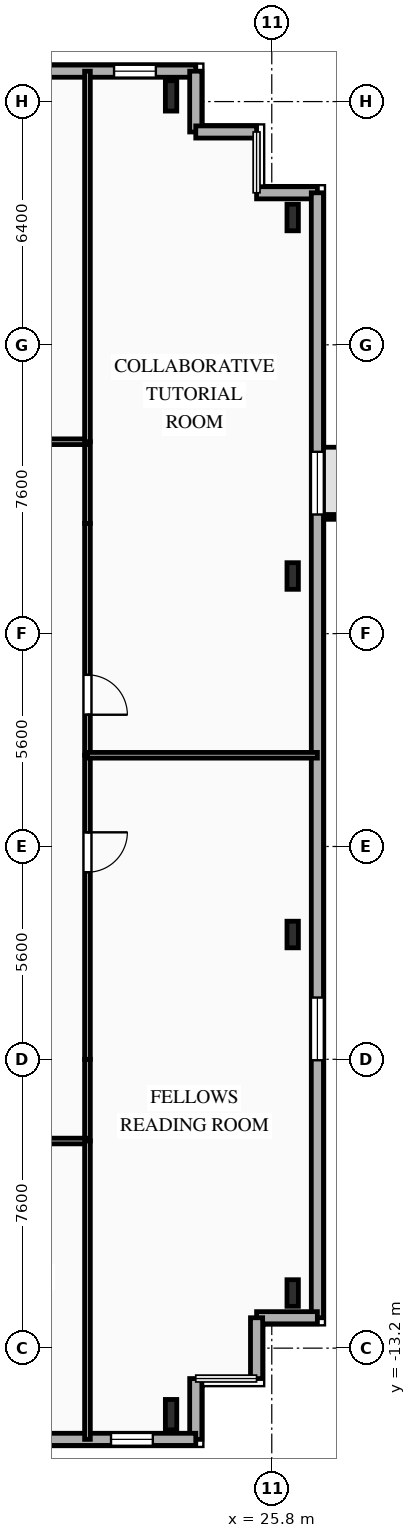
"""IFC4 building model, lengths in metres.
Left out: names, types, materials, properties, quantities, classifications, styles, units other than length and angle.
Written with IfcOpenShell. Run it as: python <this file> out.ifc"""

import sys

from ifc_helpers import new_model, si_unit, direction, frame, frame_2d, origin, origin_2d, place, context, subcontext, project, spatial, rectangle, i_section, extrude, element, fill, save


model = new_model("IFC4")
c1 = context("Model", 3, precision=1e-05, world=origin(), true_north=direction((0.0, 1.0)))
c2 = subcontext(c1, "Body", "Model", "MODEL_VIEW")
j1 = project(units=[si_unit("LENGTHUNIT", "METRE"), si_unit("PLANEANGLEUNIT", "RADIAN")], contexts=[c1])
p1 = place(None, origin())
s1 = spatial("IfcSite", under=j1, at=p1, CompositionType="ELEMENT")
p2 = place(p1, origin())
s2 = spatial("IfcBuilding", under=s1, at=p2, CompositionType="ELEMENT")
p3 = place(p2, frame((0.0, 0.0, 164.5)))
s3 = spatial("IfcBuildingStorey", under=s2, at=p3, CompositionType="ELEMENT", Elevation=164.5)
for number, where, z_axis, x_axis in (
    (1, (23.15, -14.95, 0.0), (0.0, 0.0, 1.0), (1.0, 0.0, 0.0)),
    (2, (23.15, 19.75, 0.0), (0.0, 0.0, 1.0), (1.0, 0.0, 0.0)),
):
    element("IfcColumn", number, at=place(p3, frame(where, z_axis=z_axis, x_axis=x_axis)), inside=s3, PredefinedType="COLUMN", context=c2, shape_type="SweptSolid", body=[
        extrude(i_section(OverallWidth=0.3, OverallDepth=0.8, WebThickness=0.018, FlangeThickness=0.033, FilletRadius=0.03, at=origin_2d()), origin(), (0.0, 0.0, 1.0), 3.35),
    ])
for number, where, z_axis, x_axis in (
    (3, (26.35, -11.75, 0.0), (0.0, 0.0, 1.0), (1.0, 0.0, 0.0)),
    (4, (26.35, -2.317, 0.0), (0.0, 0.0, 1.0), (1.0, 0.0, 0.0)),
    (5, (26.35, 7.117, 0.0), (0.0, 0.0, 1.0), (1.0, 0.0, 0.0)),
    (6, (26.35, 16.55, 0.0), (0.0, 0.0, 1.0), (1.0, 0.0, 0.0)),
):
    element("IfcColumn", number, at=place(p3, frame(where, z_axis=z_axis, x_axis=x_axis)), inside=s3, PredefinedType="COLUMN", context=c2, shape_type="SweptSolid", body=[
        extrude(i_section(OverallWidth=0.3, OverallDepth=0.7, WebThickness=0.017, FlangeThickness=0.032, FilletRadius=0.027, at=origin_2d()), origin(), (0.0, 0.0, 1.0), 3.35),
    ])
p4 = place(p3, frame((-25.8, 20.4, 0.0), z_axis=(0.0, 0.0, 1.0), x_axis=(1.0, 0.0, 0.0)))
e7 = element("IfcWall", 7, at=p4, inside=s3, PredefinedType="SOLIDWALL", context=c2, shape_type="SweptSolid", body=[
    extrude(rectangle(XDim=49.6, YDim=0.32, at=frame_2d((24.8, 0.0))), origin(), (0.0, 0.0, 1.0), 3.04),
])
p5 = place(p4, frame((2.135, 0.0, 0.85)))
e8 = element("IfcOpeningElement", 8, at=p5, cuts=e7, PredefinedType="OPENING", context=c2, shape_type="SweptSolid", body=[
    extrude(rectangle(XDim=1.65, YDim=1.85, at=frame_2d((0.825, 0.925))), frame((0.0, 0.17, 0.0), z_axis=(0.0, -1.0, 0.0), x_axis=(1.0, 0.0, 0.0)), (0.0, 0.0, 1.0), 0.34),
])
p6 = place(p4, frame((6.295, 0.0, 0.85)))
e9 = element("IfcOpeningElement", 9, at=p6, cuts=e7, PredefinedType="OPENING", context=c2, shape_type="SweptSolid", body=[
    extrude(rectangle(XDim=1.65, YDim=1.85, at=frame_2d((0.825, 0.925))), frame((0.0, 0.17, 0.0), z_axis=(0.0, -1.0, 0.0), x_axis=(1.0, 0.0, 0.0)), (0.0, 0.0, 1.0), 0.34),
])
p7 = place(p4, frame((10.775, 0.0, 0.85)))
e10 = element("IfcOpeningElement", 10, at=p7, cuts=e7, PredefinedType="OPENING", context=c2, shape_type="SweptSolid", body=[
    extrude(rectangle(XDim=1.65, YDim=1.85, at=frame_2d((0.825, 0.925))), frame((0.0, 0.17, 0.0), z_axis=(0.0, -1.0, 0.0), x_axis=(1.0, 0.0, 0.0)), (0.0, 0.0, 1.0), 0.34),
])
p8 = place(p4, frame((18.49, 0.0, 0.85)))
e11 = element("IfcOpeningElement", 11, at=p8, cuts=e7, PredefinedType="OPENING", context=c2, shape_type="SweptSolid", body=[
    extrude(rectangle(XDim=1.5, YDim=1.85, at=frame_2d((0.75, 0.925))), frame((0.0, 0.17, 0.0), z_axis=(0.0, -1.0, 0.0), x_axis=(1.0, 0.0, 0.0)), (0.0, 0.0, 1.0), 0.34),
])
p9 = place(p4, frame((25.34, 0.0, 0.85)))
e12 = element("IfcOpeningElement", 12, at=p9, cuts=e7, PredefinedType="OPENING", context=c2, shape_type="SweptSolid", body=[
    extrude(rectangle(XDim=2.2, YDim=1.85, at=frame_2d((1.1, 0.925))), frame((0.0, 0.17, 0.0), z_axis=(0.0, -1.0, 0.0), x_axis=(1.0, 0.0, 0.0)), (0.0, 0.0, 1.0), 0.34),
])
p10 = place(p4, frame((33.74, 0.0, 0.85)))
e13 = element("IfcOpeningElement", 13, at=p10, cuts=e7, PredefinedType="OPENING", context=c2, shape_type="SweptSolid", body=[
    extrude(rectangle(XDim=2.2, YDim=1.85, at=frame_2d((1.1, 0.925))), frame((0.0, 0.17, 0.0), z_axis=(0.0, -1.0, 0.0), x_axis=(1.0, 0.0, 0.0)), (0.0, 0.0, 1.0), 0.34),
])
p11 = place(p4, frame((42.095, 0.0, 0.85)))
e14 = element("IfcOpeningElement", 14, at=p11, cuts=e7, PredefinedType="OPENING", context=c2, shape_type="SweptSolid", body=[
    extrude(rectangle(XDim=1.65, YDim=1.85, at=frame_2d((0.825, 0.925))), frame((0.0, 0.17, 0.0), z_axis=(0.0, -1.0, 0.0), x_axis=(1.0, 0.0, 0.0)), (0.0, 0.0, 1.0), 0.34),
])
p12 = place(p4, frame((47.45, 0.0, 0.85)))
e15 = element("IfcOpeningElement", 15, at=p12, cuts=e7, PredefinedType="OPENING", context=c2, shape_type="SweptSolid", body=[
    extrude(rectangle(XDim=1.1, YDim=1.85, at=frame_2d((0.55, 0.925))), frame((0.0, 0.17, 0.0), z_axis=(0.0, -1.0, 0.0), x_axis=(1.0, 0.0, 0.0)), (0.0, 0.0, 1.0), 0.34),
])
for number, where, z_axis, x_axis in (
    (16, (23.8, 20.4, 0.0), (0.0, 0.0, 1.0), (0.0, -1.0, 0.0)),
    (17, (23.8, 18.8, 0.0), (0.0, 0.0, 1.0), (1.0, 0.0, 0.0)),
):
    element("IfcWall", number, at=place(p3, frame(where, z_axis=z_axis, x_axis=x_axis)), inside=s3, PredefinedType="SOLIDWALL", context=c2, shape_type="SweptSolid", body=[
        extrude(rectangle(XDim=1.6, YDim=0.32, at=frame_2d((0.8, 0.0))), origin(), (0.0, 0.0, 1.0), 3.04),
    ])
p13 = place(p3, frame((25.4, 17.2, 0.0), z_axis=(0.0, 0.0, 1.0), x_axis=(1.0, 0.0, 0.0)))
e18 = element("IfcWall", 18, at=p13, inside=s3, PredefinedType="SOLIDWALL", context=c2, shape_type="SweptSolid", body=[
    extrude(rectangle(XDim=1.6, YDim=0.32, at=frame_2d((0.8, 0.0))), origin(), (0.0, 0.0, 1.0), 3.04),
])
p14 = place(p3, frame((27.0, 17.2, 0.0), z_axis=(0.0, 0.0, 1.0), x_axis=(0.0, -1.0, 0.0)))
e19 = element("IfcWall", 19, at=p14, inside=s3, PredefinedType="SOLIDWALL", context=c2, shape_type="SweptSolid", body=[
    extrude(rectangle(XDim=29.6, YDim=0.32, at=frame_2d((14.8, 0.0))), origin(), (0.0, 0.0, 1.0), 3.04),
])
p15 = place(p14, frame((6.815, 0.0, 0.85)))
e20 = element("IfcOpeningElement", 20, at=p15, cuts=e19, PredefinedType="OPENING", context=c2, shape_type="SweptSolid", body=[
    extrude(rectangle(XDim=1.65, YDim=1.85, at=frame_2d((0.825, 0.925))), frame((0.0, 0.17, 0.0), z_axis=(0.0, -1.0, 0.0), x_axis=(1.0, 0.0, 0.0)), (0.0, 0.0, 1.0), 0.34),
])
p16 = place(p14, frame((21.175, 0.0, 0.85)))
e21 = element("IfcOpeningElement", 21, at=p16, cuts=e19, PredefinedType="OPENING", context=c2, shape_type="SweptSolid", body=[
    extrude(rectangle(XDim=1.65, YDim=1.85, at=frame_2d((0.825, 0.925))), frame((0.0, 0.17, 0.0), z_axis=(0.0, -1.0, 0.0), x_axis=(1.0, 0.0, 0.0)), (0.0, 0.0, 1.0), 0.34),
])
for number, where, z_axis, x_axis in (
    (22, (27.0, -12.4, 0.0), (0.0, 0.0, 1.0), (-1.0, 0.0, 0.0)),
    (23, (25.4, -12.4, 0.0), (0.0, 0.0, 1.0), (0.0, -1.0, 0.0)),
    (24, (23.8, -14.0, 0.0), (0.0, 0.0, 1.0), (0.0, -1.0, 0.0)),
):
    element("IfcWall", number, at=place(p3, frame(where, z_axis=z_axis, x_axis=x_axis)), inside=s3, PredefinedType="SOLIDWALL", context=c2, shape_type="SweptSolid", body=[
        extrude(rectangle(XDim=1.6, YDim=0.32, at=frame_2d((0.8, 0.0))), origin(), (0.0, 0.0, 1.0), 3.04),
    ])
p17 = place(p3, frame((23.8, -15.6, 0.0), z_axis=(0.0, 0.0, 1.0), x_axis=(-1.0, 0.0, 0.0)))
e25 = element("IfcWall", 25, at=p17, inside=s3, PredefinedType="SOLIDWALL", context=c2, shape_type="SweptSolid", body=[
    extrude(rectangle(XDim=49.6, YDim=0.32, at=frame_2d((24.8, 0.0))), origin(), (0.0, 0.0, 1.0), 3.04),
])
p18 = place(p17, frame((1.13, 0.0, 0.85)))
e26 = element("IfcOpeningElement", 26, at=p18, cuts=e25, PredefinedType="OPENING", context=c2, shape_type="SweptSolid", body=[
    extrude(rectangle(XDim=1.1, YDim=1.85, at=frame_2d((0.55, 0.925))), frame((0.0, 0.17, 0.0), z_axis=(0.0, -1.0, 0.0), x_axis=(1.0, 0.0, 0.0)), (0.0, 0.0, 1.0), 0.34),
])
p19 = place(p17, frame((5.695, 0.0, 0.85)))
e27 = element("IfcOpeningElement", 27, at=p19, cuts=e25, PredefinedType="OPENING", context=c2, shape_type="SweptSolid", body=[
    extrude(rectangle(XDim=1.65, YDim=1.85, at=frame_2d((0.825, 0.925))), frame((0.0, 0.17, 0.0), z_axis=(0.0, -1.0, 0.0), x_axis=(1.0, 0.0, 0.0)), (0.0, 0.0, 1.0), 0.34),
])
p20 = place(p17, frame((12.975, 0.0, 0.85)))
e28 = element("IfcOpeningElement", 28, at=p20, cuts=e25, PredefinedType="OPENING", context=c2, shape_type="SweptSolid", body=[
    extrude(rectangle(XDim=1.65, YDim=1.85, at=frame_2d((0.825, 0.925))), frame((0.0, 0.17, 0.0), z_axis=(0.0, -1.0, 0.0), x_axis=(1.0, 0.0, 0.0)), (0.0, 0.0, 1.0), 0.34),
])
p21 = place(p17, frame((21.636, 0.0, 0.85)))
e29 = element("IfcOpeningElement", 29, at=p21, cuts=e25, PredefinedType="OPENING", context=c2, shape_type="SweptSolid", body=[
    extrude(rectangle(XDim=2.2, YDim=1.85, at=frame_2d((1.1, 0.925))), frame((0.0, 0.17, 0.0), z_axis=(0.0, -1.0, 0.0), x_axis=(1.0, 0.0, 0.0)), (0.0, 0.0, 1.0), 0.34),
])
p22 = place(p17, frame((33.935, 0.0, 0.85)))
e30 = element("IfcOpeningElement", 30, at=p22, cuts=e25, PredefinedType="OPENING", context=c2, shape_type="SweptSolid", body=[
    extrude(rectangle(XDim=1.65, YDim=1.85, at=frame_2d((0.825, 0.925))), frame((0.0, 0.17, 0.0), z_axis=(0.0, -1.0, 0.0), x_axis=(1.0, 0.0, 0.0)), (0.0, 0.0, 1.0), 0.34),
])
p23 = place(p17, frame((41.24, 0.0, 0.85)))
e31 = element("IfcOpeningElement", 31, at=p23, cuts=e25, PredefinedType="OPENING", context=c2, shape_type="SweptSolid", body=[
    extrude(rectangle(XDim=1.65, YDim=1.85, at=frame_2d((0.825, 0.925))), frame((0.0, 0.17, 0.0), z_axis=(0.0, -1.0, 0.0), x_axis=(1.0, 0.0, 0.0)), (0.0, 0.0, 1.0), 0.34),
])
p24 = place(p17, frame((46.175, 0.0, 0.85)))
e32 = element("IfcOpeningElement", 32, at=p24, cuts=e25, PredefinedType="OPENING", context=c2, shape_type="SweptSolid", body=[
    extrude(rectangle(XDim=1.65, YDim=1.85, at=frame_2d((0.825, 0.925))), frame((0.0, 0.17, 0.0), z_axis=(0.0, -1.0, 0.0), x_axis=(1.0, 0.0, 0.0)), (0.0, 0.0, 1.0), 0.34),
])
p25 = place(p3, frame((20.95, 10.65, 0.0), z_axis=(0.0, 0.0, 1.0), x_axis=(0.0, -1.0, 0.0)))
e33 = element("IfcWall", 33, at=p25, inside=s3, PredefinedType="PARTITIONING", context=c2, shape_type="SweptSolid", body=[
    extrude(rectangle(XDim=2.15, YDim=0.15, at=frame_2d((1.075, 0.0))), origin(), (0.0, 0.0, 1.0), 3.04),
])
p26 = place(p3, frame((13.17, 10.65, 0.0), z_axis=(0.0, 0.0, 1.0), x_axis=(1.0, 0.0, 0.0)))
e34 = element("IfcWall", 34, at=p26, inside=s3, PredefinedType="PARTITIONING", context=c2, shape_type="SweptSolid", body=[
    extrude(rectangle(XDim=7.78, YDim=0.15, at=frame_2d((3.89, 0.0))), origin(), (0.0, 0.0, 1.0), 3.04),
])
p27 = place(p26, frame((1.276, 0.0, 0.0)))
e35 = element("IfcOpeningElement", 35, at=p27, cuts=e34, PredefinedType="OPENING", context=c2, shape_type="SweptSolid", body=[
    extrude(rectangle(XDim=1.05, YDim=2.15, at=frame_2d((0.525, 1.075))), frame((0.0, 0.085, 0.0), z_axis=(0.0, -1.0, 0.0), x_axis=(1.0, 0.0, 0.0)), (0.0, 0.0, 1.0), 0.17),
])
p28 = place(p3, frame((20.95, -5.6, 0.0), z_axis=(0.0, 0.0, 1.0), x_axis=(0.0, -1.0, 0.0)))
e36 = element("IfcWall", 36, at=p28, inside=s3, PredefinedType="PARTITIONING", context=c2, shape_type="SweptSolid", body=[
    extrude(rectangle(XDim=2.15, YDim=0.15, at=frame_2d((1.075, 0.0))), origin(), (0.0, 0.0, 1.0), 3.04),
])
p29 = place(p3, frame((20.95, -7.75, 0.0), z_axis=(0.0, 0.0, 1.0), x_axis=(-1.0, 0.0, 0.0)))
e37 = element("IfcWall", 37, at=p29, inside=s3, PredefinedType="PARTITIONING", context=c2, shape_type="SweptSolid", body=[
    extrude(rectangle(XDim=7.283, YDim=0.15, at=frame_2d((3.642, 0.0))), origin(), (0.0, 0.0, 1.0), 3.04),
])
p30 = place(p29, frame((5.019, 0.0, 0.0)))
e38 = element("IfcOpeningElement", 38, at=p30, cuts=e37, PredefinedType="OPENING", context=c2, shape_type="SweptSolid", body=[
    extrude(rectangle(XDim=1.05, YDim=2.15, at=frame_2d((0.525, 1.075))), frame((0.0, 0.085, 0.0), z_axis=(0.0, -1.0, 0.0), x_axis=(1.0, 0.0, 0.0)), (0.0, 0.0, 1.0), 0.17),
])
p31 = place(p3, frame((20.95, 2.4, 0.0), z_axis=(0.0, 0.0, 1.0), x_axis=(0.0, -1.0, 0.0)))
e39 = element("IfcWall", 39, at=p31, inside=s3, PredefinedType="PARTITIONING", context=c2, shape_type="SweptSolid", body=[
    extrude(rectangle(XDim=8.0, YDim=0.15, at=frame_2d((4.0, 0.0))), origin(), (0.0, 0.0, 1.0), 3.04),
])
p32 = place(p31, frame((2.028, 0.0, 0.0)))
e40 = element("IfcOpeningElement", 40, at=p32, cuts=e39, PredefinedType="OPENING", context=c2, shape_type="SweptSolid", body=[
    extrude(rectangle(XDim=1.05, YDim=2.15, at=frame_2d((0.525, 1.075))), frame((0.0, 0.085, 0.0), z_axis=(0.0, -1.0, 0.0), x_axis=(1.0, 0.0, 0.0)), (0.0, 0.0, 1.0), 0.17),
])
p33 = place(p3, frame((20.95, 8.5, 0.0), z_axis=(0.0, 0.0, 1.0), x_axis=(0.0, -1.0, 0.0)))
e41 = element("IfcWall", 41, at=p33, inside=s3, PredefinedType="PARTITIONING", context=c2, shape_type="SweptSolid", body=[
    extrude(rectangle(XDim=6.1, YDim=0.15, at=frame_2d((3.05, 0.0))), origin(), (0.0, 0.0, 1.0), 3.04),
])
p34 = place(p33, frame((3.984, 0.0, 0.0)))
e42 = element("IfcOpeningElement", 42, at=p34, cuts=e41, PredefinedType="OPENING", context=c2, shape_type="SweptSolid", body=[
    extrude(rectangle(XDim=1.05, YDim=2.15, at=frame_2d((0.525, 1.075))), frame((0.0, 0.085, 0.0), z_axis=(0.0, -1.0, 0.0), x_axis=(1.0, 0.0, 0.0)), (0.0, 0.0, 1.0), 0.17),
])
p35 = place(p3, frame((20.95, 2.4, 0.0), z_axis=(0.0, 0.0, 1.0), x_axis=(1.0, 0.0, 0.0)))
e43 = element("IfcWall", 43, at=p35, inside=s3, PredefinedType="PARTITIONING", context=c2, shape_type="SweptSolid", body=[
    extrude(rectangle(XDim=6.05, YDim=0.15, at=frame_2d((3.025, 0.0))), origin(), (0.0, 0.0, 1.0), 3.04),
])
p36 = place(p3, frame((20.95, -15.6, 0.0), z_axis=(0.0, 0.0, 1.0), x_axis=(0.0, 1.0, 0.0)))
e44 = element("IfcWall", 44, at=p36, inside=s3, PredefinedType="PARTITIONING", context=c2, shape_type="SweptSolid", body=[
    extrude(rectangle(XDim=7.85, YDim=0.15, at=frame_2d((3.925, 0.0))), origin(), (0.0, 0.0, 1.0), 3.04),
])
p37 = place(p3, frame((20.95, 10.65, 0.0), z_axis=(0.0, 0.0, 1.0), x_axis=(0.0, 1.0, 0.0)))
e45 = element("IfcWall", 45, at=p37, inside=s3, PredefinedType="PARTITIONING", context=c2, shape_type="SweptSolid", body=[
    extrude(rectangle(XDim=9.75, YDim=0.15, at=frame_2d((4.875, 0.0))), origin(), (0.0, 0.0, 1.0), 2.525),
])
p38 = place(p12, origin())
e46 = element("IfcWindow", 46, at=p38, inside=s3, PartitioningType="SINGLE_PANEL", PredefinedType="WINDOW", context=c2, shape_type="SweptSolid", body=[
    extrude(rectangle(XDim=1.1, YDim=1.85, at=frame_2d((0.55, 0.925))), frame((0.0, 0.03, 0.0), z_axis=(0.0, -1.0, 0.0), x_axis=(1.0, 0.0, 0.0)), (0.0, 0.0, 1.0), 0.06),
])
fill(e15, e46)
p39 = place(p15, origin())
e47 = element("IfcWindow", 47, at=p39, inside=s3, PartitioningType="SINGLE_PANEL", PredefinedType="WINDOW", context=c2, shape_type="SweptSolid", body=[
    extrude(rectangle(XDim=1.65, YDim=1.85, at=frame_2d((0.825, 0.925))), frame((0.0, 0.03, 0.0), z_axis=(0.0, -1.0, 0.0), x_axis=(1.0, 0.0, 0.0)), (0.0, 0.0, 1.0), 0.06),
])
fill(e20, e47)
p40 = place(p16, origin())
e48 = element("IfcWindow", 48, at=p40, inside=s3, PartitioningType="SINGLE_PANEL", PredefinedType="WINDOW", context=c2, shape_type="SweptSolid", body=[
    extrude(rectangle(XDim=1.65, YDim=1.85, at=frame_2d((0.825, 0.925))), frame((0.0, 0.03, 0.0), z_axis=(0.0, -1.0, 0.0), x_axis=(1.0, 0.0, 0.0)), (0.0, 0.0, 1.0), 0.06),
])
fill(e21, e48)
p41 = place(p18, origin())
e49 = element("IfcWindow", 49, at=p41, inside=s3, PartitioningType="SINGLE_PANEL", PredefinedType="WINDOW", context=c2, shape_type="SweptSolid", body=[
    extrude(rectangle(XDim=1.1, YDim=1.85, at=frame_2d((0.55, 0.925))), frame((0.0, 0.03, 0.0), z_axis=(0.0, -1.0, 0.0), x_axis=(1.0, 0.0, 0.0)), (0.0, 0.0, 1.0), 0.06),
])
fill(e26, e49)
p42 = place(p32, origin())
e50 = element("IfcDoor", 50, at=p42, inside=s3, OperationType="SINGLE_SWING_LEFT", PredefinedType="DOOR", context=c2, shape_type="SweptSolid", body=[
    extrude(rectangle(XDim=1.05, YDim=2.15, at=frame_2d((0.525, 1.075))), frame((0.0, 0.025, 0.0), z_axis=(0.0, -1.0, 0.0), x_axis=(1.0, 0.0, 0.0)), (0.0, 0.0, 1.0), 0.05),
])
fill(e40, e50)
p43 = place(p34, origin())
e51 = element("IfcDoor", 51, at=p43, inside=s3, OperationType="SINGLE_SWING_RIGHT", PredefinedType="DOOR", context=c2, shape_type="SweptSolid", body=[
    extrude(rectangle(XDim=1.05, YDim=2.15, at=frame_2d((0.525, 1.075))), frame((0.0, 0.025, 0.0), z_axis=(0.0, -1.0, 0.0), x_axis=(1.0, 0.0, 0.0)), (0.0, 0.0, 1.0), 0.05),
])
fill(e42, e51)
save(model, sys.argv[1])
